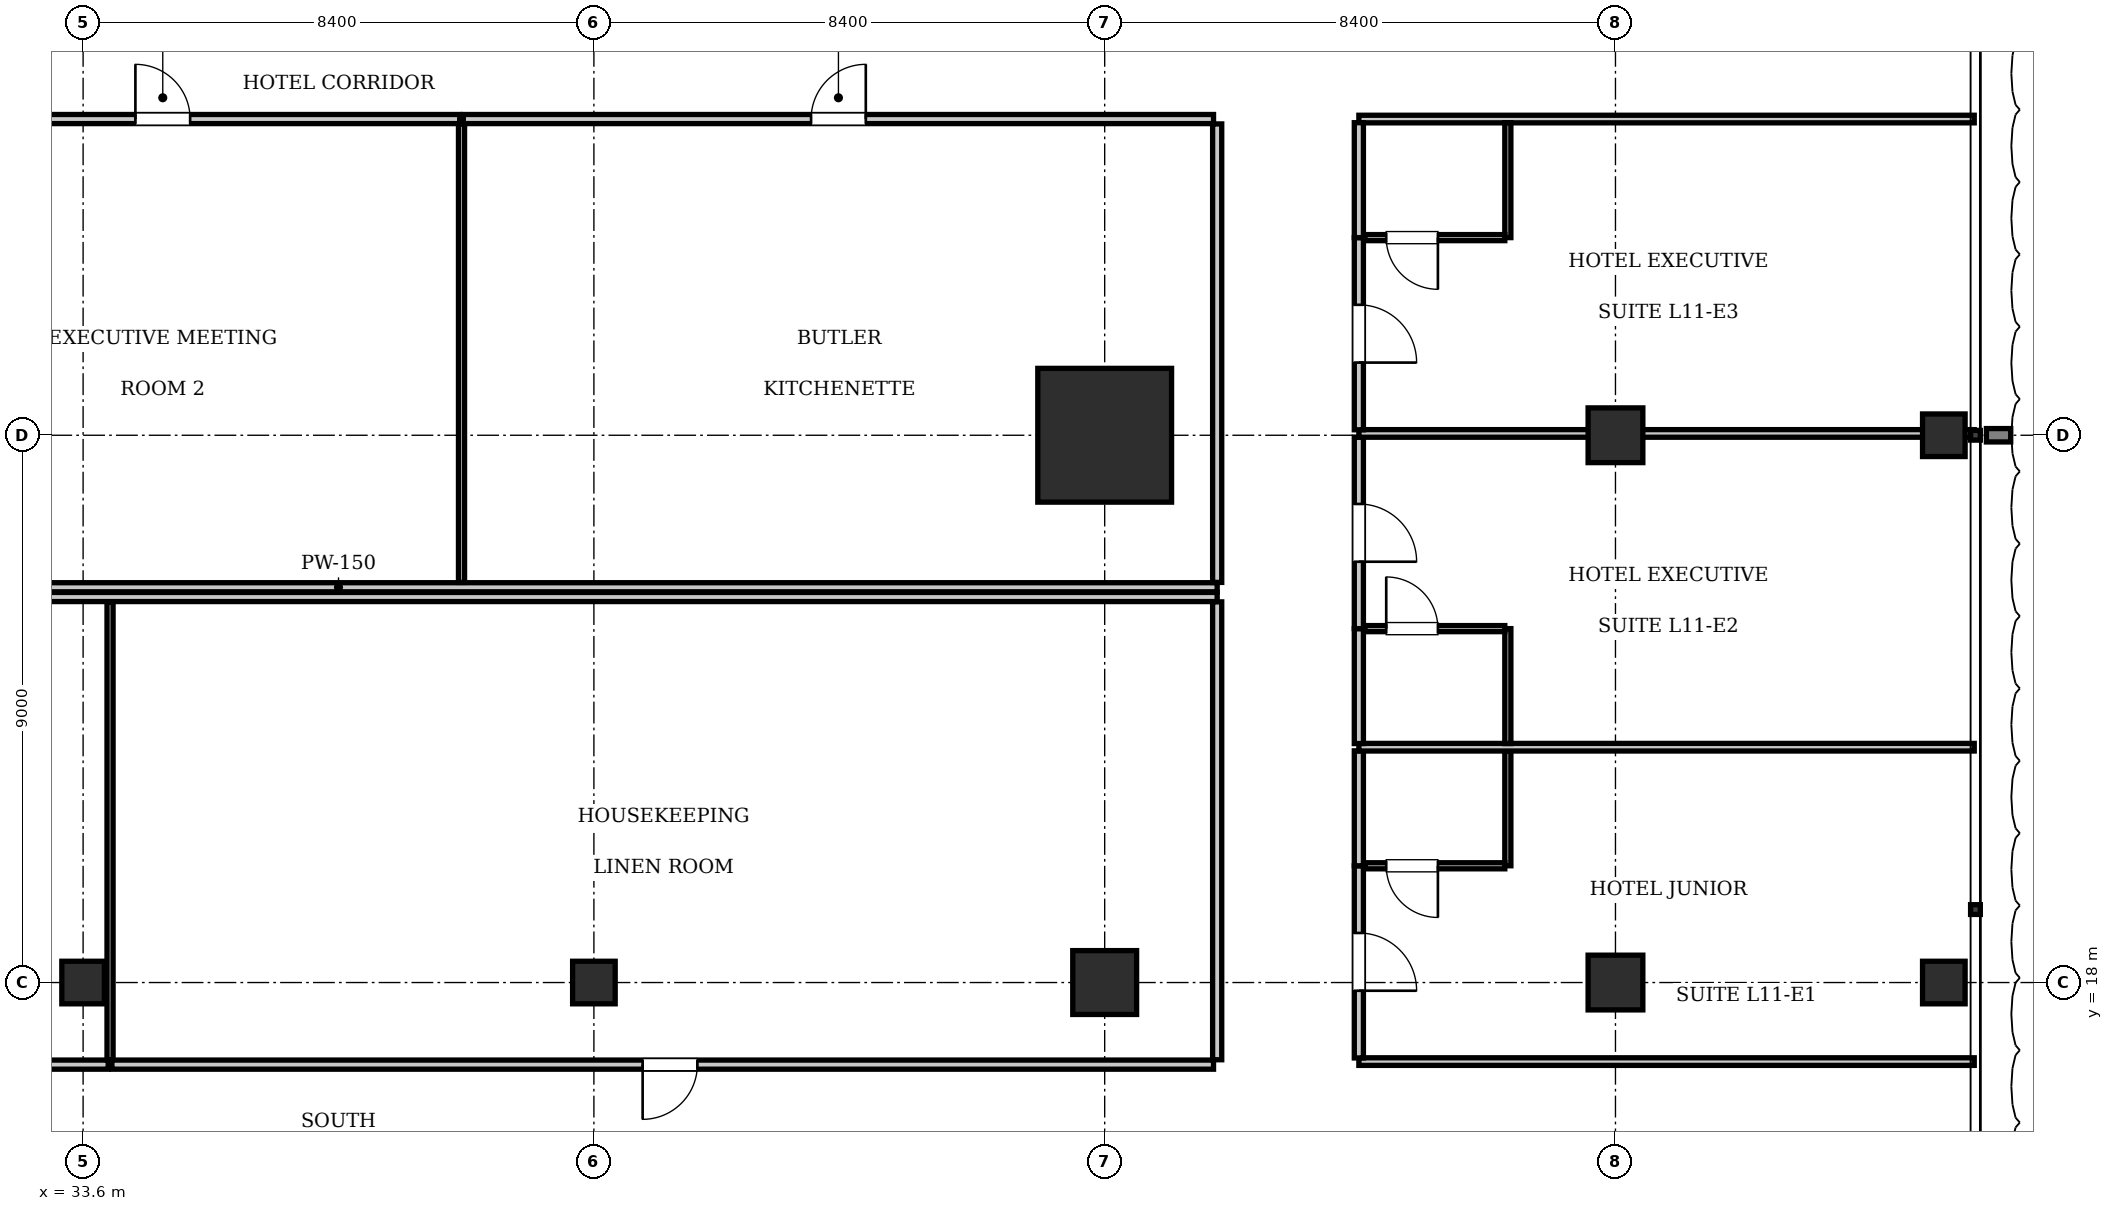
"""IFC4 building model, lengths in metres.
Left out: names, types, materials, properties, quantities, classifications, styles, units other than length and angle.
Written with IfcOpenShell. Run it as: python <this file> out.ifc"""

import sys

from ifc_helpers import new_model, si_unit, direction, frame, frame_2d, origin, origin_2d, place, context, subcontext, project, spatial, rectangle, i_section, extrude, element, fill, save


model = new_model("IFC4")
c1 = context("Model", 3, precision=1e-05, world=origin(), true_north=direction((0.0, 1.0)))
c2 = subcontext(c1, "Body", "Model", "MODEL_VIEW")
j1 = project(units=[si_unit("LENGTHUNIT", "METRE"), si_unit("PLANEANGLEUNIT", "RADIAN")], contexts=[c1])
p1 = place(None, origin())
s1 = spatial("IfcSite", under=j1, at=p1, CompositionType="ELEMENT")
p2 = place(p1, origin())
s2 = spatial("IfcBuilding", under=s1, at=p2, CompositionType="ELEMENT")
p3 = place(p2, frame((0.0, 0.0, 50.05)))
s3 = spatial("IfcBuildingStorey", under=s2, at=p3, CompositionType="ELEMENT", Elevation=50.05)
p4 = place(p3, frame((50.4, 27.0, 0.0), z_axis=(0.0, 0.0, 1.0), x_axis=(1.0, 0.0, 0.0)))
e1 = element("IfcColumn", 1, at=p4, inside=s3, PredefinedType="COLUMN", context=c2, shape_type="SweptSolid", body=[
    extrude(rectangle(XDim=2.2, YDim=2.2, at=origin_2d()), origin(), (0.0, 0.0, 1.0), 3.85),
])
p5 = place(p3, frame((50.4, 18.0, 0.0), z_axis=(0.0, 0.0, 1.0), x_axis=(1.0, 0.0, 0.0)))
e2 = element("IfcColumn", 2, at=p5, inside=s3, PredefinedType="COLUMN", context=c2, shape_type="SweptSolid", body=[
    extrude(rectangle(XDim=1.05, YDim=1.05, at=origin_2d()), origin(), (0.0, 0.0, 1.0), 3.85),
])
for number, where, z_axis, x_axis in (
    (3, (33.6, 18.0, 0.0), (0.0, 0.0, 1.0), (1.0, 0.0, 0.0)),
    (4, (42.0, 18.0, 0.0), (0.0, 0.0, 1.0), (1.0, 0.0, 0.0)),
):
    element("IfcColumn", number, at=place(p3, frame(where, z_axis=z_axis, x_axis=x_axis)), inside=s3, PredefinedType="COLUMN", context=c2, shape_type="SweptSolid", body=[
        extrude(i_section(OverallWidth=0.7, OverallDepth=0.7, WebThickness=0.028, FlangeThickness=0.044, at=origin_2d()), origin(), (0.0, 0.0, 1.0), 3.85),
    ])
for number, where, z_axis, x_axis in (
    (5, (58.8, 18.0, 0.0), (0.0, 0.0, 1.0), (1.0, 0.0, 0.0)),
    (6, (58.8, 27.0, 0.0), (0.0, 0.0, 1.0), (1.0, 0.0, 0.0)),
):
    element("IfcColumn", number, at=place(p3, frame(where, z_axis=z_axis, x_axis=x_axis)), inside=s3, PredefinedType="COLUMN", context=c2, shape_type="SweptSolid", body=[
        extrude(rectangle(XDim=0.9, YDim=0.9, at=origin_2d()), origin(), (0.0, 0.0, 1.0), 3.85),
    ])
for number, where, z_axis, x_axis in (
    (7, (64.2, 18.0, 0.0), (0.0, 0.0, 1.0), (1.0, 0.0, 0.0)),
    (8, (64.2, 27.0, 0.0), (0.0, 0.0, 1.0), (1.0, 0.0, 0.0)),
):
    element("IfcColumn", number, at=place(p3, frame(where, z_axis=z_axis, x_axis=x_axis)), inside=s3, PredefinedType="COLUMN", context=c2, shape_type="SweptSolid", body=[
        extrude(i_section(OverallWidth=0.7, OverallDepth=0.7, WebThickness=0.028, FlangeThickness=0.044, at=origin_2d()), origin(), (0.0, 0.0, 1.0), 3.85),
    ])
p6 = place(p3, frame((23.35, 24.5, 0.0), z_axis=(0.0, 0.0, 1.0), x_axis=(1.0, 0.0, 0.0)))
e9 = element("IfcWall", 9, at=p6, inside=s3, PredefinedType="PARTITIONING", context=c2, shape_type="SweptSolid", body=[
    extrude(rectangle(XDim=28.9, YDim=0.15, at=frame_2d((14.45, 0.0))), origin(), (0.0, 0.0, 1.0), 3.61),
])
p7 = place(p3, frame((52.25, 24.58, 0.0), z_axis=(0.0, 0.0, 1.0), x_axis=(0.0, 1.0, 0.0)))
e10 = element("IfcWall", 10, at=p7, inside=s3, PredefinedType="PARTITIONING", context=c2, shape_type="SweptSolid", body=[
    extrude(rectangle(XDim=7.54, YDim=0.15, at=frame_2d((3.77, 0.0))), origin(), (0.0, 0.0, 1.0), 3.61),
])
p8 = place(p3, frame((30.027, 32.2, 0.0), z_axis=(0.0, 0.0, 1.0), x_axis=(1.0, 0.0, 0.0)))
e11 = element("IfcWall", 11, at=p8, inside=s3, PredefinedType="PARTITIONING", context=c2, shape_type="SweptSolid", body=[
    extrude(rectangle(XDim=9.766, YDim=0.15, at=frame_2d((4.883, 0.0))), origin(), (0.0, 0.0, 1.0), 3.61),
])
p9 = place(p8, frame((4.433, 0.0, 0.0)))
e12 = element("IfcOpeningElement", 12, at=p9, cuts=e11, PredefinedType="OPENING", context=c2, shape_type="SweptSolid", body=[
    extrude(rectangle(XDim=0.9, YDim=2.1, at=frame_2d((0.45, 1.05))), frame((0.0, 0.085, 0.0), z_axis=(0.0, -1.0, 0.0), x_axis=(1.0, 0.0, 0.0)), (0.0, 0.0, 1.0), 0.17),
])
p10 = place(p3, frame((39.823, 24.58, 0.0), z_axis=(0.0, 0.0, 1.0), x_axis=(0.0, 1.0, 0.0)))
e13 = element("IfcWall", 13, at=p10, inside=s3, PredefinedType="PARTITIONING", context=c2, shape_type="SweptSolid", body=[
    extrude(rectangle(XDim=7.54, YDim=0.1, at=frame_2d((3.77, 0.0))), origin(), (0.0, 0.0, 1.0), 3.61),
])
p11 = place(p3, frame((39.853, 32.2, 0.0), z_axis=(0.0, 0.0, 1.0), x_axis=(1.0, 0.0, 0.0)))
e14 = element("IfcWall", 14, at=p11, inside=s3, PredefinedType="PARTITIONING", context=c2, shape_type="SweptSolid", body=[
    extrude(rectangle(XDim=12.337, YDim=0.15, at=frame_2d((6.168, 0.0))), origin(), (0.0, 0.0, 1.0), 3.61),
])
p12 = place(p11, frame((5.719, 0.0, 0.0)))
e15 = element("IfcOpeningElement", 15, at=p12, cuts=e14, PredefinedType="OPENING", context=c2, shape_type="SweptSolid", body=[
    extrude(rectangle(XDim=0.9, YDim=2.1, at=frame_2d((0.45, 1.05))), frame((0.0, 0.085, 0.0), z_axis=(0.0, -1.0, 0.0), x_axis=(1.0, 0.0, 0.0)), (0.0, 0.0, 1.0), 0.17),
])
p13 = place(p3, frame((23.35, 24.34, 0.0), z_axis=(0.0, 0.0, 1.0), x_axis=(1.0, 0.0, 0.0)))
e16 = element("IfcWall", 16, at=p13, inside=s3, PredefinedType="PARTITIONING", context=c2, shape_type="SweptSolid", body=[
    extrude(rectangle(XDim=28.9, YDim=0.15, at=frame_2d((14.45, 0.0))), origin(), (0.0, 0.0, 1.0), 3.61),
])
p14 = place(p3, frame((52.25, 16.73, 0.0), z_axis=(0.0, 0.0, 1.0), x_axis=(0.0, 1.0, 0.0)))
e17 = element("IfcWall", 17, at=p14, inside=s3, PredefinedType="PARTITIONING", context=c2, shape_type="SweptSolid", body=[
    extrude(rectangle(XDim=7.53, YDim=0.15, at=frame_2d((3.765, 0.0))), origin(), (0.0, 0.0, 1.0), 3.61),
])
p15 = place(p3, frame((23.41, 16.65, 0.0), z_axis=(0.0, 0.0, 1.0), x_axis=(1.0, 0.0, 0.0)))
e18 = element("IfcWall", 18, at=p15, inside=s3, PredefinedType="PARTITIONING", context=c2, shape_type="SweptSolid", body=[
    extrude(rectangle(XDim=10.603, YDim=0.15, at=frame_2d((5.302, 0.0))), origin(), (0.0, 0.0, 1.0), 3.61),
])
p16 = place(p15, frame((4.852, 0.0, 0.0)))
e19 = element("IfcOpeningElement", 19, at=p16, cuts=e18, PredefinedType="OPENING", context=c2, shape_type="SweptSolid", body=[
    extrude(rectangle(XDim=0.9, YDim=2.1, at=frame_2d((0.45, 1.05))), frame((0.0, 0.085, 0.0), z_axis=(0.0, -1.0, 0.0), x_axis=(1.0, 0.0, 0.0)), (0.0, 0.0, 1.0), 0.17),
])
p17 = place(p3, frame((34.043, 16.73, 0.0), z_axis=(0.0, 0.0, 1.0), x_axis=(0.0, 1.0, 0.0)))
e20 = element("IfcWall", 20, at=p17, inside=s3, PredefinedType="PARTITIONING", context=c2, shape_type="SweptSolid", body=[
    extrude(rectangle(XDim=7.53, YDim=0.1, at=frame_2d((3.765, 0.0))), origin(), (0.0, 0.0, 1.0), 3.61),
])
p18 = place(p3, frame((34.073, 16.65, 0.0), z_axis=(0.0, 0.0, 1.0), x_axis=(1.0, 0.0, 0.0)))
e21 = element("IfcWall", 21, at=p18, inside=s3, PredefinedType="PARTITIONING", context=c2, shape_type="SweptSolid", body=[
    extrude(rectangle(XDim=18.117, YDim=0.15, at=frame_2d((9.059, 0.0))), origin(), (0.0, 0.0, 1.0), 3.61),
])
p19 = place(p18, frame((8.729, 0.0, 0.0)))
e22 = element("IfcOpeningElement", 22, at=p19, cuts=e21, PredefinedType="OPENING", context=c2, shape_type="SweptSolid", body=[
    extrude(rectangle(XDim=0.9, YDim=2.1, at=frame_2d((0.45, 1.05))), frame((0.0, 0.085, 0.0), z_axis=(0.0, -1.0, 0.0), x_axis=(1.0, 0.0, 0.0)), (0.0, 0.0, 1.0), 0.17),
])
for number, where, z_axis, x_axis in (
    (23, (54.58, 16.7, 0.0), (0.0, 0.0, 1.0), (1.0, 0.0, 0.0)),
    (24, (54.58, 32.2, 0.0), (0.0, 0.0, 1.0), (1.0, 0.0, 0.0)),
):
    element("IfcWall", number, at=place(p3, frame(where, z_axis=z_axis, x_axis=x_axis)), inside=s3, PredefinedType="PARTITIONING", context=c2, shape_type="SweptSolid", body=[
        extrude(rectangle(XDim=10.12, YDim=0.125, at=frame_2d((5.06, 0.0))), origin(), (0.0, 0.0, 1.0), 3.61),
    ])
p20 = place(p3, frame((54.58, 16.76, 0.0), z_axis=(0.0, 0.0, 1.0), x_axis=(0.0, 1.0, 0.0)))
e25 = element("IfcWall", 25, at=p20, inside=s3, PredefinedType="PARTITIONING", context=c2, shape_type="SweptSolid", body=[
    extrude(rectangle(XDim=3.16, YDim=0.15, at=frame_2d((1.58, 0.0))), origin(), (0.0, 0.0, 1.0), 3.207),
])
p21 = place(p20, frame((1.105, 0.0, 0.0)))
e26 = element("IfcOpeningElement", 26, at=p21, cuts=e25, PredefinedType="OPENING", context=c2, shape_type="SweptSolid", body=[
    extrude(rectangle(XDim=0.95, YDim=2.15, at=frame_2d((0.475, 1.075))), frame((0.0, 0.085, 0.0), z_axis=(0.0, -1.0, 0.0), x_axis=(1.0, 0.0, 0.0)), (0.0, 0.0, 1.0), 0.17),
])
p22 = place(p3, frame((54.58, 19.92, 0.0), z_axis=(0.0, 0.0, 1.0), x_axis=(0.0, 1.0, 0.0)))
e27 = element("IfcWall", 27, at=p22, inside=s3, PredefinedType="PARTITIONING", context=c2, shape_type="SweptSolid", body=[
    extrude(rectangle(XDim=1.89, YDim=0.15, at=frame_2d((0.945, 0.0))), origin(), (0.0, 0.0, 1.0), 3.207),
])
p23 = place(p3, frame((57.03, 19.92, 0.0), z_axis=(0.0, 0.0, 1.0), x_axis=(0.0, 1.0, 0.0)))
e28 = element("IfcWall", 28, at=p23, inside=s3, PredefinedType="PARTITIONING", context=c2, shape_type="SweptSolid", body=[
    extrude(rectangle(XDim=1.89, YDim=0.1, at=frame_2d((0.945, 0.0))), origin(), (0.0, 0.0, 1.0), 3.61),
])
p24 = place(p3, frame((54.68, 19.92, 0.0), z_axis=(0.0, 0.0, 1.0), x_axis=(1.0, 0.0, 0.0)))
e29 = element("IfcWall", 29, at=p24, inside=s3, PredefinedType="PARTITIONING", context=c2, shape_type="SweptSolid", body=[
    extrude(rectangle(XDim=2.3, YDim=0.1, at=frame_2d((1.15, 0.0))), origin(), (0.0, 0.0, 1.0), 3.61),
])
p25 = place(p24, frame((0.35, 0.0, 0.0)))
e30 = element("IfcOpeningElement", 30, at=p25, cuts=e29, PredefinedType="OPENING", context=c2, shape_type="SweptSolid", body=[
    extrude(rectangle(XDim=0.85, YDim=2.1, at=frame_2d((0.425, 1.05))), frame((0.0, 0.06, 0.0), z_axis=(0.0, -1.0, 0.0), x_axis=(1.0, 0.0, 0.0)), (0.0, 0.0, 1.0), 0.12),
])
p26 = place(p3, frame((54.58, 21.87, 0.0), z_axis=(0.0, 0.0, 1.0), x_axis=(1.0, 0.0, 0.0)))
e31 = element("IfcWall", 31, at=p26, inside=s3, PredefinedType="PARTITIONING", context=c2, shape_type="SweptSolid", body=[
    extrude(rectangle(XDim=10.12, YDim=0.125, at=frame_2d((5.06, 0.0))), origin(), (0.0, 0.0, 1.0), 3.61),
])
p27 = place(p3, frame((54.58, 21.93, 0.0), z_axis=(0.0, 0.0, 1.0), x_axis=(0.0, 1.0, 0.0)))
e32 = element("IfcWall", 32, at=p27, inside=s3, PredefinedType="PARTITIONING", context=c2, shape_type="SweptSolid", body=[
    extrude(rectangle(XDim=1.89, YDim=0.15, at=frame_2d((0.945, 0.0))), origin(), (0.0, 0.0, 1.0), 3.207),
])
p28 = place(p3, frame((54.58, 23.82, 0.0), z_axis=(0.0, 0.0, 1.0), x_axis=(0.0, 1.0, 0.0)))
e33 = element("IfcWall", 33, at=p28, inside=s3, PredefinedType="PARTITIONING", context=c2, shape_type="SweptSolid", body=[
    extrude(rectangle(XDim=3.15, YDim=0.15, at=frame_2d((1.575, 0.0))), origin(), (0.0, 0.0, 1.0), 3.207),
])
p29 = place(p28, frame((1.1, 0.0, 0.0)))
e34 = element("IfcOpeningElement", 34, at=p29, cuts=e33, PredefinedType="OPENING", context=c2, shape_type="SweptSolid", body=[
    extrude(rectangle(XDim=0.95, YDim=2.15, at=frame_2d((0.475, 1.075))), frame((0.0, 0.085, 0.0), z_axis=(0.0, -1.0, 0.0), x_axis=(1.0, 0.0, 0.0)), (0.0, 0.0, 1.0), 0.17),
])
p30 = place(p3, frame((57.03, 21.93, 0.0), z_axis=(0.0, 0.0, 1.0), x_axis=(0.0, 1.0, 0.0)))
e35 = element("IfcWall", 35, at=p30, inside=s3, PredefinedType="PARTITIONING", context=c2, shape_type="SweptSolid", body=[
    extrude(rectangle(XDim=1.89, YDim=0.1, at=frame_2d((0.945, 0.0))), origin(), (0.0, 0.0, 1.0), 3.61),
])
p31 = place(p3, frame((54.68, 23.82, 0.0), z_axis=(0.0, 0.0, 1.0), x_axis=(1.0, 0.0, 0.0)))
e36 = element("IfcWall", 36, at=p31, inside=s3, PredefinedType="PARTITIONING", context=c2, shape_type="SweptSolid", body=[
    extrude(rectangle(XDim=2.3, YDim=0.1, at=frame_2d((1.15, 0.0))), origin(), (0.0, 0.0, 1.0), 3.61),
])
p32 = place(p31, frame((0.35, 0.0, 0.0)))
e37 = element("IfcOpeningElement", 37, at=p32, cuts=e36, PredefinedType="OPENING", context=c2, shape_type="SweptSolid", body=[
    extrude(rectangle(XDim=0.85, YDim=2.1, at=frame_2d((0.425, 1.05))), frame((0.0, 0.06, 0.0), z_axis=(0.0, -1.0, 0.0), x_axis=(1.0, 0.0, 0.0)), (0.0, 0.0, 1.0), 0.12),
])
p33 = place(p3, frame((54.58, 27.03, 0.0), z_axis=(0.0, 0.0, 1.0), x_axis=(1.0, 0.0, 0.0)))
e38 = element("IfcWall", 38, at=p33, inside=s3, PredefinedType="PARTITIONING", context=c2, shape_type="SweptSolid", body=[
    extrude(rectangle(XDim=10.12, YDim=0.125, at=frame_2d((5.06, 0.0))), origin(), (0.0, 0.0, 1.0), 2.988),
])
p34 = place(p3, frame((54.58, 27.09, 0.0), z_axis=(0.0, 0.0, 1.0), x_axis=(0.0, 1.0, 0.0)))
e39 = element("IfcWall", 39, at=p34, inside=s3, PredefinedType="PARTITIONING", context=c2, shape_type="SweptSolid", body=[
    extrude(rectangle(XDim=3.16, YDim=0.15, at=frame_2d((1.58, 0.0))), origin(), (0.0, 0.0, 1.0), 3.263),
])
p35 = place(p34, frame((1.105, 0.0, 0.0)))
e40 = element("IfcOpeningElement", 40, at=p35, cuts=e39, PredefinedType="OPENING", context=c2, shape_type="SweptSolid", body=[
    extrude(rectangle(XDim=0.95, YDim=2.15, at=frame_2d((0.475, 1.075))), frame((0.0, 0.085, 0.0), z_axis=(0.0, -1.0, 0.0), x_axis=(1.0, 0.0, 0.0)), (0.0, 0.0, 1.0), 0.17),
])
p36 = place(p3, frame((54.58, 30.25, 0.0), z_axis=(0.0, 0.0, 1.0), x_axis=(0.0, 1.0, 0.0)))
e41 = element("IfcWall", 41, at=p36, inside=s3, PredefinedType="PARTITIONING", context=c2, shape_type="SweptSolid", body=[
    extrude(rectangle(XDim=1.89, YDim=0.15, at=frame_2d((0.945, 0.0))), origin(), (0.0, 0.0, 1.0), 3.263),
])
p37 = place(p3, frame((57.03, 30.25, 0.0), z_axis=(0.0, 0.0, 1.0), x_axis=(0.0, 1.0, 0.0)))
e42 = element("IfcWall", 42, at=p37, inside=s3, PredefinedType="PARTITIONING", context=c2, shape_type="SweptSolid", body=[
    extrude(rectangle(XDim=1.89, YDim=0.1, at=frame_2d((0.945, 0.0))), origin(), (0.0, 0.0, 1.0), 3.61),
])
p38 = place(p3, frame((54.68, 30.25, 0.0), z_axis=(0.0, 0.0, 1.0), x_axis=(1.0, 0.0, 0.0)))
e43 = element("IfcWall", 43, at=p38, inside=s3, PredefinedType="PARTITIONING", context=c2, shape_type="SweptSolid", body=[
    extrude(rectangle(XDim=2.3, YDim=0.1, at=frame_2d((1.15, 0.0))), origin(), (0.0, 0.0, 1.0), 3.61),
])
p39 = place(p38, frame((0.35, 0.0, 0.0)))
e44 = element("IfcOpeningElement", 44, at=p39, cuts=e43, PredefinedType="OPENING", context=c2, shape_type="SweptSolid", body=[
    extrude(rectangle(XDim=0.85, YDim=2.1, at=frame_2d((0.425, 1.05))), frame((0.0, 0.06, 0.0), z_axis=(0.0, -1.0, 0.0), x_axis=(1.0, 0.0, 0.0)), (0.0, 0.0, 1.0), 0.12),
])
p40 = place(p9, origin())
e45 = element("IfcDoor", 45, at=p40, inside=s3, OperationType="SINGLE_SWING_LEFT", PredefinedType="DOOR", context=c2, shape_type="SweptSolid", body=[
    extrude(rectangle(XDim=0.9, YDim=2.1, at=frame_2d((0.45, 1.05))), frame((0.0, 0.025, 0.0), z_axis=(0.0, -1.0, 0.0), x_axis=(1.0, 0.0, 0.0)), (0.0, 0.0, 1.0), 0.05),
])
fill(e12, e45)
p41 = place(p12, origin())
e46 = element("IfcDoor", 46, at=p41, inside=s3, OperationType="SINGLE_SWING_RIGHT", PredefinedType="DOOR", context=c2, shape_type="SweptSolid", body=[
    extrude(rectangle(XDim=0.9, YDim=2.1, at=frame_2d((0.45, 1.05))), frame((0.0, 0.025, 0.0), z_axis=(0.0, -1.0, 0.0), x_axis=(1.0, 0.0, 0.0)), (0.0, 0.0, 1.0), 0.05),
])
fill(e15, e46)
p42 = place(p19, frame((0.9, 0.0, 0.0), z_axis=(0.0, 0.0, 1.0), x_axis=(-1.0, 0.0, 0.0)))
e47 = element("IfcDoor", 47, at=p42, inside=s3, OperationType="SINGLE_SWING_RIGHT", PredefinedType="DOOR", context=c2, shape_type="SweptSolid", body=[
    extrude(rectangle(XDim=0.9, YDim=2.1, at=frame_2d((0.45, 1.05))), frame((0.0, 0.025, 0.0), z_axis=(0.0, -1.0, 0.0), x_axis=(1.0, 0.0, 0.0)), (0.0, 0.0, 1.0), 0.05),
])
fill(e22, e47)
p43 = place(p25, frame((0.85, 0.0, 0.0), z_axis=(0.0, 0.0, 1.0), x_axis=(-1.0, 0.0, 0.0)))
e48 = element("IfcDoor", 48, at=p43, inside=s3, OperationType="SINGLE_SWING_LEFT", PredefinedType="DOOR", context=c2, shape_type="SweptSolid", body=[
    extrude(rectangle(XDim=0.85, YDim=2.1, at=frame_2d((0.425, 1.05))), frame((0.0, 0.025, 0.0), z_axis=(0.0, -1.0, 0.0), x_axis=(1.0, 0.0, 0.0)), (0.0, 0.0, 1.0), 0.05),
])
fill(e30, e48)
p44 = place(p21, frame((0.95, 0.0, 0.0), z_axis=(0.0, 0.0, 1.0), x_axis=(-1.0, 0.0, 0.0)))
e49 = element("IfcDoor", 49, at=p44, inside=s3, OperationType="SINGLE_SWING_RIGHT", PredefinedType="DOOR", context=c2, shape_type="SweptSolid", body=[
    extrude(rectangle(XDim=0.95, YDim=2.15, at=frame_2d((0.475, 1.075))), frame((0.0, 0.025, 0.0), z_axis=(0.0, -1.0, 0.0), x_axis=(1.0, 0.0, 0.0)), (0.0, 0.0, 1.0), 0.05),
])
fill(e26, e49)
p45 = place(p32, origin())
e50 = element("IfcDoor", 50, at=p45, inside=s3, OperationType="SINGLE_SWING_LEFT", PredefinedType="DOOR", context=c2, shape_type="SweptSolid", body=[
    extrude(rectangle(XDim=0.85, YDim=2.1, at=frame_2d((0.425, 1.05))), frame((0.0, 0.025, 0.0), z_axis=(0.0, -1.0, 0.0), x_axis=(1.0, 0.0, 0.0)), (0.0, 0.0, 1.0), 0.05),
])
fill(e37, e50)
p46 = place(p29, frame((0.95, 0.0, 0.0), z_axis=(0.0, 0.0, 1.0), x_axis=(-1.0, 0.0, 0.0)))
e51 = element("IfcDoor", 51, at=p46, inside=s3, OperationType="SINGLE_SWING_RIGHT", PredefinedType="DOOR", context=c2, shape_type="SweptSolid", body=[
    extrude(rectangle(XDim=0.95, YDim=2.15, at=frame_2d((0.475, 1.075))), frame((0.0, 0.025, 0.0), z_axis=(0.0, -1.0, 0.0), x_axis=(1.0, 0.0, 0.0)), (0.0, 0.0, 1.0), 0.05),
])
fill(e34, e51)
p47 = place(p39, frame((0.85, 0.0, 0.0), z_axis=(0.0, 0.0, 1.0), x_axis=(-1.0, 0.0, 0.0)))
e52 = element("IfcDoor", 52, at=p47, inside=s3, OperationType="SINGLE_SWING_LEFT", PredefinedType="DOOR", context=c2, shape_type="SweptSolid", body=[
    extrude(rectangle(XDim=0.85, YDim=2.1, at=frame_2d((0.425, 1.05))), frame((0.0, 0.025, 0.0), z_axis=(0.0, -1.0, 0.0), x_axis=(1.0, 0.0, 0.0)), (0.0, 0.0, 1.0), 0.05),
])
fill(e44, e52)
p48 = place(p35, frame((0.95, 0.0, 0.0), z_axis=(0.0, 0.0, 1.0), x_axis=(-1.0, 0.0, 0.0)))
e53 = element("IfcDoor", 53, at=p48, inside=s3, OperationType="SINGLE_SWING_RIGHT", PredefinedType="DOOR", context=c2, shape_type="SweptSolid", body=[
    extrude(rectangle(XDim=0.95, YDim=2.15, at=frame_2d((0.475, 1.075))), frame((0.0, 0.025, 0.0), z_axis=(0.0, -1.0, 0.0), x_axis=(1.0, 0.0, 0.0)), (0.0, 0.0, 1.0), 0.05),
])
fill(e40, e53)
save(model, sys.argv[1])
